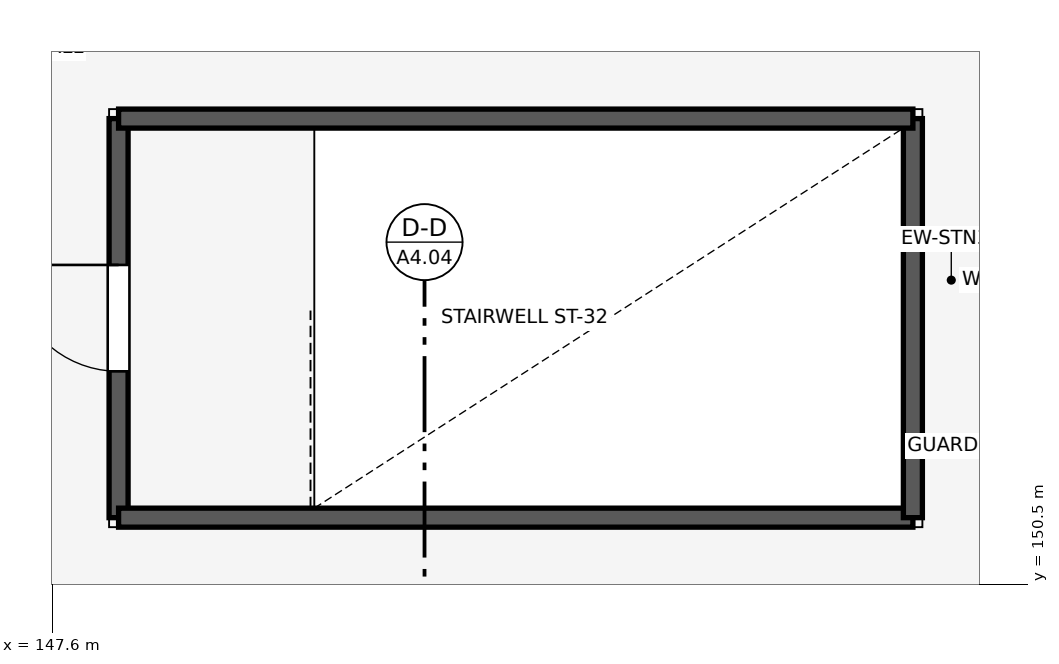
"""IFC4 building model, lengths in metres.
Left out: names, types, materials, properties, quantities, classifications, styles, units other than length and angle.
Written with IfcOpenShell. Run it as: python <this file> out.ifc"""

import sys

from ifc_helpers import new_model, si_unit, direction, frame, frame_2d, origin, place, context, subcontext, project, spatial, rectangle, extrude, element, fill, save


model = new_model("IFC4")
c1 = context("Model", 3, precision=1e-05, world=origin(), true_north=direction((0.0, 1.0)))
c2 = subcontext(c1, "Body", "Model", "MODEL_VIEW")
j1 = project(units=[si_unit("LENGTHUNIT", "METRE"), si_unit("PLANEANGLEUNIT", "RADIAN")], contexts=[c1])
p1 = place(None, origin())
s1 = spatial("IfcSite", under=j1, at=p1, CompositionType="ELEMENT")
p2 = place(p1, origin())
s2 = spatial("IfcBuilding", under=s1, at=p2, CompositionType="ELEMENT")
p3 = place(p2, frame((0.0, 0.0, 15.6)))
s3 = spatial("IfcBuildingStorey", under=s2, at=p3, CompositionType="ELEMENT", Elevation=15.6)
p4 = place(p3, frame((148.475, 156.625, 0.0), z_axis=(0.0, 0.0, 1.0), x_axis=(0.0, -1.0, 0.0)))
e1 = element("IfcWall", 1, at=p4, inside=s3, PredefinedType="SHEAR", context=c2, shape_type="SweptSolid", body=[
    extrude(rectangle(XDim=5.25, YDim=0.25, at=frame_2d((2.625, 0.0))), origin(), (0.0, 0.0, 1.0), 3.2),
])
p5 = place(p4, frame((1.925, 0.0, 0.0)))
e2 = element("IfcOpeningElement", 2, at=p5, cuts=e1, PredefinedType="OPENING", context=c2, shape_type="SweptSolid", body=[
    extrude(rectangle(XDim=1.4, YDim=2.2, at=frame_2d((0.7, 1.1))), frame((0.0, 0.135, 0.0), z_axis=(0.0, -1.0, 0.0), x_axis=(1.0, 0.0, 0.0)), (0.0, 0.0, 1.0), 0.27),
])
p6 = place(p3, frame((148.475, 151.375, 0.0), z_axis=(0.0, 0.0, 1.0), x_axis=(1.0, 0.0, 0.0)))
e3 = element("IfcWall", 3, at=p6, inside=s3, PredefinedType="SHEAR", context=c2, shape_type="SweptSolid", body=[
    extrude(rectangle(XDim=10.45, YDim=0.25, at=frame_2d((5.225, 0.0))), origin(), (0.0, 0.0, 1.0), 3.2),
])
p7 = place(p3, frame((158.925, 151.375, 0.0), z_axis=(0.0, 0.0, 1.0), x_axis=(0.0, 1.0, 0.0)))
e4 = element("IfcWall", 4, at=p7, inside=s3, PredefinedType="SHEAR", context=c2, shape_type="SweptSolid", body=[
    extrude(rectangle(XDim=5.25, YDim=0.25, at=frame_2d((2.625, 0.0))), origin(), (0.0, 0.0, 1.0), 3.2),
])
p8 = place(p3, frame((158.925, 156.625, 0.0), z_axis=(0.0, 0.0, 1.0), x_axis=(-1.0, 0.0, 0.0)))
e5 = element("IfcWall", 5, at=p8, inside=s3, PredefinedType="SHEAR", context=c2, shape_type="SweptSolid", body=[
    extrude(rectangle(XDim=10.45, YDim=0.25, at=frame_2d((5.225, 0.0))), origin(), (0.0, 0.0, 1.0), 3.2),
])
p9 = place(p5, frame((1.4, 0.0, 0.0), z_axis=(0.0, 0.0, 1.0), x_axis=(-1.0, 0.0, 0.0)))
e6 = element("IfcDoor", 6, at=p9, inside=s3, OperationType="SINGLE_SWING_RIGHT", PredefinedType="DOOR", context=c2, shape_type="SweptSolid", body=[
    extrude(rectangle(XDim=1.4, YDim=2.2, at=frame_2d((0.7, 1.1))), frame((0.0, 0.025, 0.0), z_axis=(0.0, -1.0, 0.0), x_axis=(1.0, 0.0, 0.0)), (0.0, 0.0, 1.0), 0.05),
])
fill(e2, e6)
save(model, sys.argv[1])
